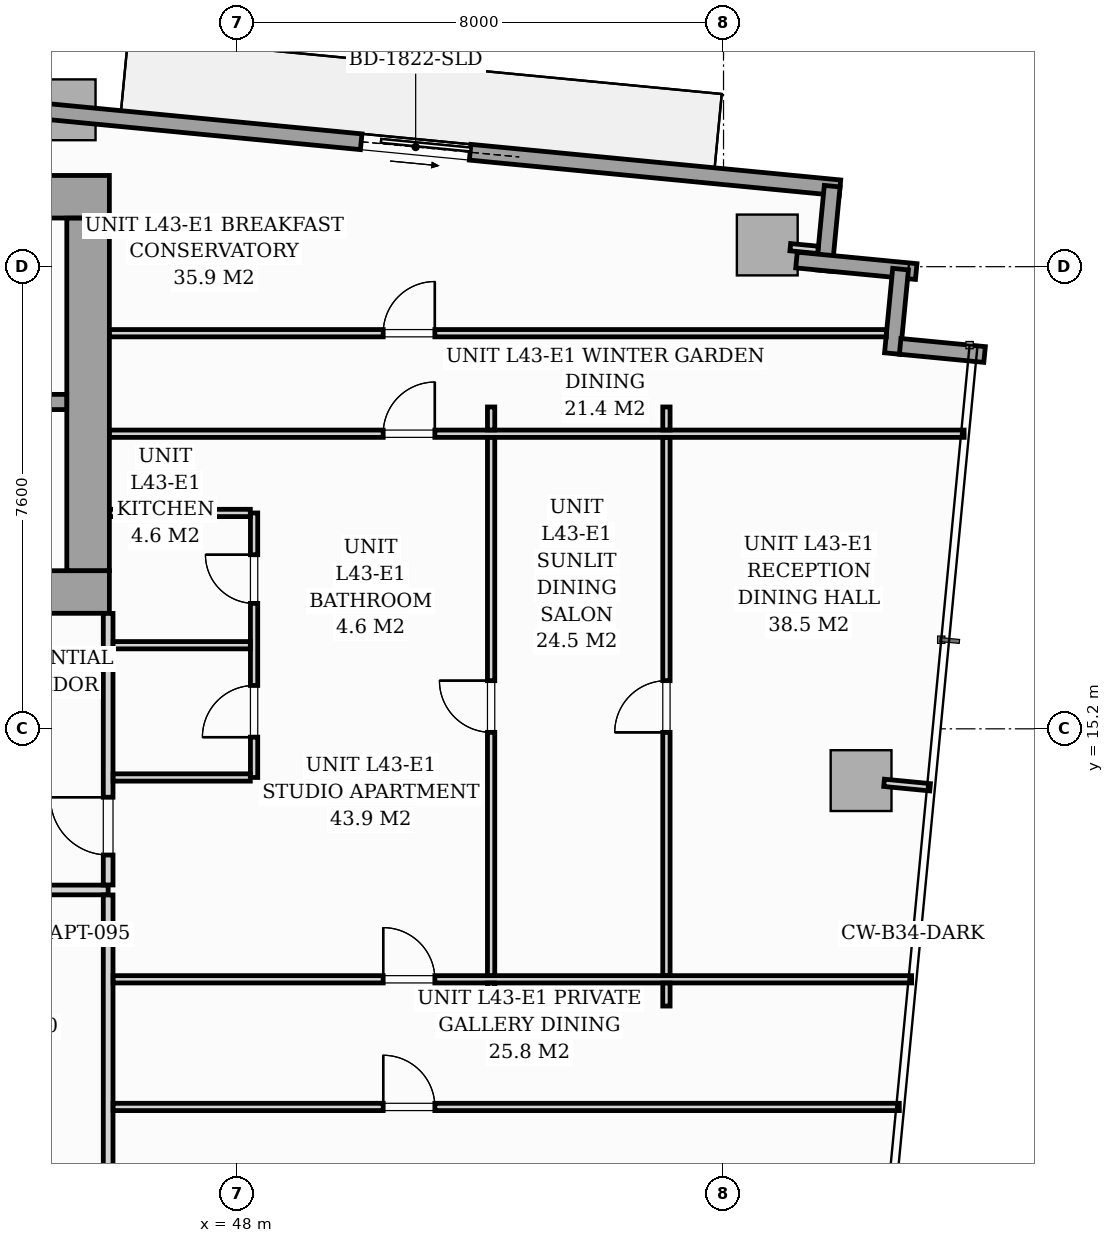
"""IFC4 building model, lengths in metres.
Left out: names, types, materials, properties, quantities, classifications, styles, units other than length and angle.
Written with IfcOpenShell. Run it as: python <this file> out.ifc"""

import sys

from ifc_helpers import new_model, si_unit, direction, frame, frame_2d, origin, origin_2d, place, context, subcontext, project, spatial, rectangle, i_section, extrude, source, transform, mapped, element, fill, save


model = new_model("IFC4")
c1 = context("Model", 3, precision=1e-05, world=origin(), true_north=direction((0.0, 1.0)))
c2 = subcontext(c1, "Body", "Model", "MODEL_VIEW")
j1 = project(units=[si_unit("LENGTHUNIT", "METRE"), si_unit("PLANEANGLEUNIT", "RADIAN")], contexts=[c1])
p1 = place(None, origin())
s1 = spatial("IfcSite", under=j1, at=p1, CompositionType="ELEMENT")
p2 = place(p1, origin())
s2 = spatial("IfcBuilding", under=s1, at=p2, CompositionType="ELEMENT")
p3 = place(p2, frame((0.0, 0.0, 150.2)))
s3 = spatial("IfcBuildingStorey", under=s2, at=p3, CompositionType="ELEMENT", Elevation=150.2)
m1 = source(origin(), c2, "Body", "SweptSolid", [
    extrude(i_section(OverallWidth=0.421, OverallDepth=0.465, WebThickness=0.045, FlangeThickness=0.073, FilletRadius=0.018, at=origin_2d()), origin(), (0.0, 0.0, 1.0), 3.196),
])
for number, where, z_axis, x_axis in (
    (1, (45.6, 17.4, 0.002), (0.0, 0.0, 1.0), (1.0, 0.0, 0.0)),
    (2, (45.6, 24.0, 0.002), (0.0, 0.0, 1.0), (1.0, 0.0, 0.0)),
):
    element("IfcColumn", number, at=place(p3, frame(where, z_axis=z_axis, x_axis=x_axis)), inside=s3, PredefinedType="PILASTER", context=c2, shape_type="MappedRepresentation", body=[
        mapped(m1, transform((0.0, 0.0, 0.0), scale=1.0)),
    ])
m2 = source(origin(), c2, "Body", "SweptSolid", [
    extrude(rectangle(XDim=1.0, YDim=1.0, at=origin_2d()), origin(), (0.0, 0.0, 1.0), 3.196),
])
for number, where, z_axis, x_axis in (
    (3, (45.173, 25.38, 0.002), (0.0, 0.0, 1.0), (0.995, -0.096, 0.0)),
    (4, (56.719, 23.157, 0.002), (0.0, 0.0, 1.0), (0.995, -0.096, 0.0)),
    (5, (58.262, 14.348, 0.002), (0.0, 0.0, 1.0), (0.995, -0.096, 0.0)),
):
    element("IfcColumn", number, at=place(p3, frame(where, z_axis=z_axis, x_axis=x_axis)), inside=s3, PredefinedType="COLUMN", context=c2, shape_type="MappedRepresentation", body=[
        mapped(m2, transform((0.0, 0.0, 0.0), scale=1.0)),
    ])
p4 = place(p3, frame((40.983, 25.727, 0.0), z_axis=(0.0, 0.0, 1.0), x_axis=(0.995395844771, -0.095849424686, 0.0)))
e6 = element("IfcWall", 6, at=p4, inside=s3, PredefinedType="STANDARD", context=c2, shape_type="SweptSolid", body=[
    extrude(rectangle(XDim=17.01, YDim=0.26, at=frame_2d((8.505, 0.0))), origin(), (0.0, 0.0, 1.0), 2.94),
])
p5 = place(p4, frame((9.1, 0.0, 0.0)))
e7 = element("IfcOpeningElement", 7, at=p5, cuts=e6, PredefinedType="OPENING", context=c2, shape_type="SweptSolid", body=[
    extrude(rectangle(XDim=1.8, YDim=2.06, at=frame_2d((0.9, 1.03))), frame((0.0, 0.14, 0.0), z_axis=(0.0, -1.0, 0.0), x_axis=(1.0, 0.0, 0.0)), (0.0, 0.0, 1.0), 0.28),
])
p6 = place(p4, frame((0.7, 0.0, 0.65)))
e8 = element("IfcOpeningElement", 8, at=p6, cuts=e6, PredefinedType="OPENING", context=c2, shape_type="SweptSolid", body=[
    extrude(rectangle(XDim=1.6, YDim=1.5, at=frame_2d((0.8, 0.75))), frame((0.0, 0.14, 0.0), z_axis=(0.0, -1.0, 0.0), x_axis=(1.0, 0.0, 0.0)), (0.0, 0.0, 1.0), 0.28),
])
p7 = place(p3, frame((57.787, 24.124, 0.0), z_axis=(0.0, 0.0, 1.0), x_axis=(-0.095915846097, -0.995389446633, 0.0)))
e9 = element("IfcWall", 9, at=p7, inside=s3, PredefinedType="STANDARD", context=c2, shape_type="SweptSolid", body=[
    extrude(rectangle(XDim=1.395, YDim=0.26, at=frame_2d((0.697, 0.0))), origin(), (0.0, 0.0, 1.0), 2.94),
])
p8 = place(p3, frame((57.2, 22.909, 0.0), z_axis=(0.0, 0.0, 1.0), x_axis=(0.995401789159, -0.095787672171, 0.0)))
e10 = element("IfcWall", 10, at=p8, inside=s3, PredefinedType="STANDARD", context=c2, shape_type="SweptSolid", body=[
    extrude(rectangle(XDim=1.978, YDim=0.26, at=frame_2d((0.989, 0.0))), origin(), (0.0, 0.0, 1.0), 2.94),
])
for number, where, z_axis, x_axis in (
    (11, (58.912, 22.76, 0.0), (0.0, 0.0, 1.0), (-0.096, -0.995, 0.0)),
    (12, (58.905, 21.49, 0.0), (0.0, 0.0, 1.0), (0.995, -0.096, 0.0)),
):
    element("IfcWall", number, at=place(p3, frame(where, z_axis=z_axis, x_axis=x_axis)), inside=s3, PredefinedType="STANDARD", context=c2, shape_type="SweptSolid", body=[
        extrude(rectangle(XDim=1.395, YDim=0.26, at=frame_2d((0.698, 0.0))), origin(), (0.0, 0.0, 1.0), 2.94),
    ])
p9 = place(p3, frame((26.1, 17.45, 0.0), z_axis=(0.0, 0.0, 1.0), x_axis=(1.0, 0.0, 0.0)))
e13 = element("IfcWall", 13, at=p9, inside=s3, PredefinedType="SHEAR", context=c2, shape_type="SweptSolid", body=[
    extrude(rectangle(XDim=19.8, YDim=0.7, at=frame_2d((9.9, 0.0))), origin(), (0.0, 0.0, 1.0), 3.2),
])
p10 = place(p9, frame((1.05, 0.0, 0.0)))
e14 = element("IfcOpeningElement", 14, at=p10, cuts=e13, PredefinedType="OPENING", context=c2, shape_type="SweptSolid", body=[
    extrude(rectangle(XDim=0.95, YDim=2.06, at=frame_2d((0.475, 1.03))), frame((0.0, 0.36, 0.0), z_axis=(0.0, -1.0, 0.0), x_axis=(1.0, 0.0, 0.0)), (0.0, 0.0, 1.0), 0.72),
])
p11 = place(p9, frame((9.48, 0.0, 0.0)))
e15 = element("IfcOpeningElement", 15, at=p11, cuts=e13, PredefinedType="OPENING", context=c2, shape_type="SweptSolid", body=[
    extrude(rectangle(XDim=0.85, YDim=2.0, at=frame_2d((0.425, 1.0))), frame((0.0, 0.36, 0.0), z_axis=(0.0, -1.0, 0.0), x_axis=(1.0, 0.0, 0.0)), (0.0, 0.0, 1.0), 0.72),
])
p12 = place(p9, frame((17.65, 0.0, 0.0)))
e16 = element("IfcOpeningElement", 16, at=p12, cuts=e13, PredefinedType="OPENING", context=c2, shape_type="SweptSolid", body=[
    extrude(rectangle(XDim=0.95, YDim=2.06, at=frame_2d((0.475, 1.03))), frame((0.0, 0.36, 0.0), z_axis=(0.0, -1.0, 0.0), x_axis=(1.0, 0.0, 0.0)), (0.0, 0.0, 1.0), 0.72),
])
p13 = place(p3, frame((26.1, 23.95, 0.0), z_axis=(0.0, 0.0, 1.0), x_axis=(1.0, 0.0, 0.0)))
e17 = element("IfcWall", 17, at=p13, inside=s3, PredefinedType="SHEAR", context=c2, shape_type="SweptSolid", body=[
    extrude(rectangle(XDim=19.8, YDim=0.7, at=frame_2d((9.9, 0.0))), origin(), (0.0, 0.0, 1.0), 3.2),
])
p14 = place(p3, frame((45.55, 17.802, 0.0), z_axis=(0.0, 0.0, 1.0), x_axis=(0.0, 1.0, 0.0)))
e18 = element("IfcWall", 18, at=p14, inside=s3, PredefinedType="SHEAR", context=c2, shape_type="SweptSolid", body=[
    extrude(rectangle(XDim=5.796, YDim=0.7, at=frame_2d((2.898, 0.0))), origin(), (0.0, 0.0, 1.0), 3.2),
])
p15 = place(p3, frame((37.05, 20.575, 0.0), z_axis=(0.0, 0.0, 1.0), x_axis=(1.0, 0.0, 0.0)))
e19 = element("IfcWall", 19, at=p15, inside=s3, PredefinedType="SOLIDWALL", context=c2, shape_type="SweptSolid", body=[
    extrude(rectangle(XDim=8.148, YDim=0.25, at=frame_2d((4.074, 0.0))), origin(), (0.0, 0.0, 1.0), 3.2),
])
p16 = place(p15, frame((6.6, 0.0, 0.0)))
e20 = element("IfcOpeningElement", 20, at=p16, cuts=e19, PredefinedType="OPENING", context=c2, shape_type="SweptSolid", body=[
    extrude(rectangle(XDim=0.95, YDim=2.06, at=frame_2d((0.475, 1.03))), frame((0.0, 0.135, 0.0), z_axis=(0.0, -1.0, 0.0), x_axis=(1.0, 0.0, 0.0)), (0.0, 0.0, 1.0), 0.27),
])
p17 = place(p3, frame((22.05, 12.55, 0.0), z_axis=(0.0, 0.0, 1.0), x_axis=(1.0, 0.0, 0.0)))
e21 = element("IfcWall", 21, at=p17, inside=s3, PredefinedType="PARTITIONING", context=c2, shape_type="SweptSolid", body=[
    extrude(rectangle(XDim=23.83, YDim=0.16, at=frame_2d((11.915, 0.0))), origin(), (0.0, 0.0, 1.0), 2.94),
])
p18 = place(p17, frame((1.873, 0.0, 0.0)))
e22 = element("IfcOpeningElement", 22, at=p18, cuts=e21, PredefinedType="OPENING", context=c2, shape_type="SweptSolid", body=[
    extrude(rectangle(XDim=0.95, YDim=2.06, at=frame_2d((0.475, 1.03))), frame((0.0, 0.09, 0.0), z_axis=(0.0, -1.0, 0.0), x_axis=(1.0, 0.0, 0.0)), (0.0, 0.0, 1.0), 0.18),
])
p19 = place(p17, frame((10.224, 0.0, 0.0)))
e23 = element("IfcOpeningElement", 23, at=p19, cuts=e21, PredefinedType="OPENING", context=c2, shape_type="SweptSolid", body=[
    extrude(rectangle(XDim=0.95, YDim=2.06, at=frame_2d((0.475, 1.03))), frame((0.0, 0.09, 0.0), z_axis=(0.0, -1.0, 0.0), x_axis=(1.0, 0.0, 0.0)), (0.0, 0.0, 1.0), 0.18),
])
p20 = place(p17, frame((21.84, 0.0, 0.0)))
e24 = element("IfcOpeningElement", 24, at=p20, cuts=e21, PredefinedType="OPENING", context=c2, shape_type="SweptSolid", body=[
    extrude(rectangle(XDim=0.95, YDim=2.06, at=frame_2d((0.475, 1.03))), frame((0.0, 0.09, 0.0), z_axis=(0.0, -1.0, 0.0), x_axis=(1.0, 0.0, 0.0)), (0.0, 0.0, 1.0), 0.18),
])
p21 = place(p3, frame((45.88, 5.958, 0.0), z_axis=(0.0, 0.0, 1.0), x_axis=(0.0, 1.0, 0.0)))
e25 = element("IfcWall", 25, at=p21, inside=s3, PredefinedType="PARTITIONING", context=c2, shape_type="SweptSolid", body=[
    extrude(rectangle(XDim=6.51, YDim=0.16, at=frame_2d((3.255, 0.0))), origin(), (0.0, 0.0, 1.0), 2.94),
])
p22 = place(p3, frame((45.88, 12.632, 0.0), z_axis=(0.0, 0.0, 1.0), x_axis=(0.0, 1.0, 0.0)))
e26 = element("IfcWall", 26, at=p22, inside=s3, PredefinedType="PARTITIONING", context=c2, shape_type="SweptSolid", body=[
    extrude(rectangle(XDim=4.466, YDim=0.16, at=frame_2d((2.233, 0.0))), origin(), (0.0, 0.0, 1.0), 2.94),
])
p23 = place(p22, frame((0.493, 0.0, 0.0)))
e27 = element("IfcOpeningElement", 27, at=p23, cuts=e26, PredefinedType="OPENING", context=c2, shape_type="SweptSolid", body=[
    extrude(rectangle(XDim=0.95, YDim=2.06, at=frame_2d((0.475, 1.03))), frame((0.0, 0.09, 0.0), z_axis=(0.0, -1.0, 0.0), x_axis=(1.0, 0.0, 0.0)), (0.0, 0.0, 1.0), 0.18),
])
p24 = place(p3, frame((48.28, 14.4, 0.0), z_axis=(0.0, 0.0, 1.0), x_axis=(0.0, 1.0, 0.0)))
e28 = element("IfcWall", 28, at=p24, inside=s3, PredefinedType="PARTITIONING", context=c2, shape_type="SweptSolid", body=[
    extrude(rectangle(XDim=4.35, YDim=0.12, at=frame_2d((2.175, 0.0))), origin(), (0.0, 0.0, 1.0), 2.94),
])
p25 = place(p24, frame((0.663, 0.0, 0.0)))
e29 = element("IfcOpeningElement", 29, at=p25, cuts=e28, PredefinedType="OPENING", context=c2, shape_type="SweptSolid", body=[
    extrude(rectangle(XDim=0.85, YDim=2.05, at=frame_2d((0.425, 1.025))), frame((0.0, 0.07, 0.0), z_axis=(0.0, -1.0, 0.0), x_axis=(1.0, 0.0, 0.0)), (0.0, 0.0, 1.0), 0.14),
])
p26 = place(p24, frame((2.863, 0.0, 0.0)))
e30 = element("IfcOpeningElement", 30, at=p26, cuts=e28, PredefinedType="OPENING", context=c2, shape_type="SweptSolid", body=[
    extrude(rectangle(XDim=0.8, YDim=2.02, at=frame_2d((0.4, 1.01))), frame((0.0, 0.07, 0.0), z_axis=(0.0, -1.0, 0.0), x_axis=(1.0, 0.0, 0.0)), (0.0, 0.0, 1.0), 0.14),
])
for number, where, z_axis, x_axis in (
    (31, (45.962, 16.575, 0.0), (0.0, 0.0, 1.0), (1.0, 0.0, 0.0)),
    (32, (45.962, 14.4, 0.0), (0.0, 0.0, 1.0), (1.0, 0.0, 0.0)),
):
    element("IfcWall", number, at=place(p3, frame(where, z_axis=z_axis, x_axis=x_axis)), inside=s3, PredefinedType="PARTITIONING", context=c2, shape_type="SweptSolid", body=[
        extrude(rectangle(XDim=2.256, YDim=0.12, at=frame_2d((1.128, 0.0))), origin(), (0.0, 0.0, 1.0), 2.94),
    ])
p27 = place(p3, frame((45.902, 18.75, 0.0), z_axis=(0.0, 0.0, 1.0), x_axis=(1.0, 0.0, 0.0)))
e33 = element("IfcWall", 33, at=p27, inside=s3, PredefinedType="PARTITIONING", context=c2, shape_type="SweptSolid", body=[
    extrude(rectangle(XDim=2.316, YDim=0.12, at=frame_2d((1.158, 0.0))), origin(), (0.0, 0.0, 1.0), 2.94),
])
p28 = place(p3, frame((45.962, 8.982, 0.0), z_axis=(0.0, 0.0, 1.0), x_axis=(1.0, 0.0, 0.0)))
e34 = element("IfcWall", 34, at=p28, inside=s3, PredefinedType="PARTITIONING", context=c2, shape_type="SweptSolid", body=[
    extrude(rectangle(XDim=12.929, YDim=0.12, at=frame_2d((6.464, 0.0))), origin(), (0.0, 0.0, 1.0), 2.94),
])
p29 = place(p28, frame((4.441, 0.0, 0.0)))
e35 = element("IfcOpeningElement", 35, at=p29, cuts=e34, PredefinedType="OPENING", context=c2, shape_type="SweptSolid", body=[
    extrude(rectangle(XDim=0.85, YDim=2.05, at=frame_2d((0.425, 1.025))), frame((0.0, 0.07, 0.0), z_axis=(0.0, -1.0, 0.0), x_axis=(1.0, 0.0, 0.0)), (0.0, 0.0, 1.0), 0.14),
])
p30 = place(p3, frame((45.902, 21.706, 0.0), z_axis=(0.0, 0.0, 1.0), x_axis=(1.0, 0.0, 0.0)))
e36 = element("IfcWall", 36, at=p30, inside=s3, PredefinedType="PARTITIONING", context=c2, shape_type="SweptSolid", body=[
    extrude(rectangle(XDim=12.775, YDim=0.12, at=frame_2d((6.388, 0.0))), origin(), (0.0, 0.0, 1.0), 2.94),
])
p31 = place(p30, frame((4.501, 0.0, 0.0)))
e37 = element("IfcOpeningElement", 37, at=p31, cuts=e36, PredefinedType="OPENING", context=c2, shape_type="SweptSolid", body=[
    extrude(rectangle(XDim=0.85, YDim=2.05, at=frame_2d((0.425, 1.025))), frame((0.0, 0.07, 0.0), z_axis=(0.0, -1.0, 0.0), x_axis=(1.0, 0.0, 0.0)), (0.0, 0.0, 1.0), 0.14),
])
p32 = place(p3, frame((45.962, 11.081, 0.0), z_axis=(0.0, 0.0, 1.0), x_axis=(1.0, 0.0, 0.0)))
e38 = element("IfcWall", 38, at=p32, inside=s3, PredefinedType="PARTITIONING", context=c2, shape_type="SweptSolid", body=[
    extrude(rectangle(XDim=13.131, YDim=0.12, at=frame_2d((6.565, 0.0))), origin(), (0.0, 0.0, 1.0), 2.94),
])
p33 = place(p32, frame((4.441, 0.0, 0.0)))
e39 = element("IfcOpeningElement", 39, at=p33, cuts=e38, PredefinedType="OPENING", context=c2, shape_type="SweptSolid", body=[
    extrude(rectangle(XDim=0.85, YDim=2.05, at=frame_2d((0.425, 1.025))), frame((0.0, 0.07, 0.0), z_axis=(0.0, -1.0, 0.0), x_axis=(1.0, 0.0, 0.0)), (0.0, 0.0, 1.0), 0.14),
])
p34 = place(p3, frame((45.902, 20.053, 0.0), z_axis=(0.0, 0.0, 1.0), x_axis=(1.0, 0.0, 0.0)))
e40 = element("IfcWall", 40, at=p34, inside=s3, PredefinedType="PARTITIONING", context=c2, shape_type="SweptSolid", body=[
    extrude(rectangle(XDim=14.055, YDim=0.12, at=frame_2d((7.027, 0.0))), origin(), (0.0, 0.0, 1.0), 2.94),
])
p35 = place(p34, frame((4.501, 0.0, 0.0)))
e41 = element("IfcOpeningElement", 41, at=p35, cuts=e40, PredefinedType="OPENING", context=c2, shape_type="SweptSolid", body=[
    extrude(rectangle(XDim=0.85, YDim=2.05, at=frame_2d((0.425, 1.025))), frame((0.0, 0.07, 0.0), z_axis=(0.0, -1.0, 0.0), x_axis=(1.0, 0.0, 0.0)), (0.0, 0.0, 1.0), 0.14),
])
p36 = place(p3, frame((55.061, 10.641, 0.0), z_axis=(0.0, 0.0, 1.0), x_axis=(0.0, 1.0, 0.0)))
e42 = element("IfcWall", 42, at=p36, inside=s3, PredefinedType="PARTITIONING", context=c2, shape_type="SweptSolid", body=[
    extrude(rectangle(XDim=0.378, YDim=0.12, at=frame_2d((0.189, 0.0))), origin(), (0.0, 0.0, 1.0), 2.94),
])
p37 = place(p3, frame((55.061, 11.143, 0.0), z_axis=(0.0, 0.0, 1.0), x_axis=(0.0, 1.0, 0.0)))
e43 = element("IfcWall", 43, at=p37, inside=s3, PredefinedType="PARTITIONING", context=c2, shape_type="SweptSolid", body=[
    extrude(rectangle(XDim=8.848, YDim=0.12, at=frame_2d((4.424, 0.0))), origin(), (0.0, 0.0, 1.0), 2.94),
])
p38 = place(p37, frame((3.999, 0.0, 0.0)))
e44 = element("IfcOpeningElement", 44, at=p38, cuts=e43, PredefinedType="OPENING", context=c2, shape_type="SweptSolid", body=[
    extrude(rectangle(XDim=0.85, YDim=2.05, at=frame_2d((0.425, 1.025))), frame((0.0, 0.07, 0.0), z_axis=(0.0, -1.0, 0.0), x_axis=(1.0, 0.0, 0.0)), (0.0, 0.0, 1.0), 0.14),
])
for number, where, z_axis, x_axis in (
    (45, (55.061, 20.115, 0.0), (0.0, 0.0, 1.0), (0.0, 1.0, 0.0)),
    (46, (52.178, 10.641, 0.0), (0.0, 0.0, 1.0), (0.0, 1.0, 0.0)),
):
    element("IfcWall", number, at=place(p3, frame(where, z_axis=z_axis, x_axis=x_axis)), inside=s3, PredefinedType="PARTITIONING", context=c2, shape_type="SweptSolid", body=[
        extrude(rectangle(XDim=0.378, YDim=0.12, at=frame_2d((0.189, 0.0))), origin(), (0.0, 0.0, 1.0), 2.94),
    ])
p39 = place(p3, frame((52.178, 11.143, 0.0), z_axis=(0.0, 0.0, 1.0), x_axis=(0.0, 1.0, 0.0)))
e47 = element("IfcWall", 47, at=p39, inside=s3, PredefinedType="PARTITIONING", context=c2, shape_type="SweptSolid", body=[
    extrude(rectangle(XDim=8.848, YDim=0.12, at=frame_2d((4.424, 0.0))), origin(), (0.0, 0.0, 1.0), 2.94),
])
p40 = place(p39, frame((3.999, 0.0, 0.0)))
e48 = element("IfcOpeningElement", 48, at=p40, cuts=e47, PredefinedType="OPENING", context=c2, shape_type="SweptSolid", body=[
    extrude(rectangle(XDim=0.85, YDim=2.05, at=frame_2d((0.425, 1.025))), frame((0.0, 0.07, 0.0), z_axis=(0.0, -1.0, 0.0), x_axis=(1.0, 0.0, 0.0)), (0.0, 0.0, 1.0), 0.14),
])
p41 = place(p3, frame((52.178, 20.115, 0.0), z_axis=(0.0, 0.0, 1.0), x_axis=(0.0, 1.0, 0.0)))
e49 = element("IfcWall", 49, at=p41, inside=s3, PredefinedType="PARTITIONING", context=c2, shape_type="SweptSolid", body=[
    extrude(rectangle(XDim=0.378, YDim=0.12, at=frame_2d((0.189, 0.0))), origin(), (0.0, 0.0, 1.0), 2.94),
])
p42 = place(p3, frame((57.098, 23.12, 0.0), z_axis=(0.0, 0.0, 1.0), x_axis=(0.995384576284, -0.09596637586, 0.0)))
e50 = element("IfcWall", 50, at=p42, inside=s3, PredefinedType="PARTITIONING", context=c2, shape_type="SweptSolid", body=[
    extrude(rectangle(XDim=0.458, YDim=0.12, at=frame_2d((0.229, 0.0))), origin(), (0.0, 0.0, 1.0), 2.94),
])
p43 = place(p3, frame((58.64, 14.312, 0.0), z_axis=(0.0, 0.0, 1.0), x_axis=(0.995377786728, -0.096036772582, 0.0)))
e51 = element("IfcWall", 51, at=p43, inside=s3, PredefinedType="PARTITIONING", context=c2, shape_type="SweptSolid", body=[
    extrude(rectangle(XDim=0.76, YDim=0.12, at=frame_2d((0.38, 0.0))), origin(), (0.0, 0.0, 1.0), 2.94),
])
m3 = source(origin(), c2, "Body", "SweptSolid", [
    extrude(rectangle(XDim=1.8, YDim=2.06, at=frame_2d((0.9, 1.03))), frame((0.0, 0.025, 0.0), z_axis=(0.0, -1.0, 0.0), x_axis=(1.0, 0.0, 0.0)), (0.0, 0.0, 1.0), 0.05),
])
p44 = place(p5, origin())
e52 = element("IfcDoor", 52, at=p44, inside=s3, OperationType="SLIDING_TO_RIGHT", PredefinedType="DOOR", context=c2, shape_type="MappedRepresentation", body=[
    mapped(m3, transform((0.0, 0.0, 0.0), scale=1.0)),
])
fill(e7, e52)
m4 = source(origin(), c2, "Body", "SweptSolid", [
    extrude(rectangle(XDim=0.95, YDim=2.06, at=frame_2d((0.475, 1.03))), frame((0.0, 0.025, 0.0), z_axis=(0.0, -1.0, 0.0), x_axis=(1.0, 0.0, 0.0)), (0.0, 0.0, 1.0), 0.05),
])
p45 = place(p23, origin())
e53 = element("IfcDoor", 53, at=p45, inside=s3, OperationType="SINGLE_SWING_RIGHT", PredefinedType="DOOR", context=c2, shape_type="MappedRepresentation", body=[
    mapped(m4, transform((0.0, 0.0, 0.0), scale=1.0)),
])
fill(e27, e53)
m5 = source(origin(), c2, "Body", "SweptSolid", [
    extrude(rectangle(XDim=0.85, YDim=2.05, at=frame_2d((0.425, 1.025))), frame((0.0, 0.025, 0.0), z_axis=(0.0, -1.0, 0.0), x_axis=(1.0, 0.0, 0.0)), (0.0, 0.0, 1.0), 0.05),
])
p46 = place(p25, origin())
e54 = element("IfcDoor", 54, at=p46, inside=s3, OperationType="SINGLE_SWING_LEFT", PredefinedType="DOOR", context=c2, shape_type="MappedRepresentation", body=[
    mapped(m5, transform((0.0, 0.0, 0.0), scale=1.0)),
])
fill(e29, e54)
m6 = source(origin(), c2, "Body", "SweptSolid", [
    extrude(rectangle(XDim=0.8, YDim=2.02, at=frame_2d((0.4, 1.01))), frame((0.0, 0.025, 0.0), z_axis=(0.0, -1.0, 0.0), x_axis=(1.0, 0.0, 0.0)), (0.0, 0.0, 1.0), 0.05),
])
p47 = place(p26, origin())
e55 = element("IfcDoor", 55, at=p47, inside=s3, OperationType="SINGLE_SWING_RIGHT", PredefinedType="DOOR", context=c2, shape_type="MappedRepresentation", body=[
    mapped(m6, transform((0.0, 0.0, 0.0), scale=1.0)),
])
fill(e30, e55)
p48 = place(p29, origin())
e56 = element("IfcDoor", 56, at=p48, inside=s3, OperationType="SINGLE_SWING_LEFT", PredefinedType="DOOR", context=c2, shape_type="MappedRepresentation", body=[
    mapped(m5, transform((0.0, 0.0, 0.0), scale=1.0)),
])
fill(e35, e56)
p49 = place(p31, origin())
e57 = element("IfcDoor", 57, at=p49, inside=s3, OperationType="SINGLE_SWING_RIGHT", PredefinedType="DOOR", context=c2, shape_type="MappedRepresentation", body=[
    mapped(m5, transform((0.0, 0.0, 0.0), scale=1.0)),
])
fill(e37, e57)
p50 = place(p33, origin())
e58 = element("IfcDoor", 58, at=p50, inside=s3, OperationType="SINGLE_SWING_LEFT", PredefinedType="DOOR", context=c2, shape_type="MappedRepresentation", body=[
    mapped(m5, transform((0.0, 0.0, 0.0), scale=1.0)),
])
fill(e39, e58)
p51 = place(p35, origin())
e59 = element("IfcDoor", 59, at=p51, inside=s3, OperationType="SINGLE_SWING_RIGHT", PredefinedType="DOOR", context=c2, shape_type="MappedRepresentation", body=[
    mapped(m5, transform((0.0, 0.0, 0.0), scale=1.0)),
])
fill(e41, e59)
p52 = place(p38, origin())
e60 = element("IfcDoor", 60, at=p52, inside=s3, OperationType="SINGLE_SWING_LEFT", PredefinedType="DOOR", context=c2, shape_type="MappedRepresentation", body=[
    mapped(m5, transform((0.0, 0.0, 0.0), scale=1.0)),
])
fill(e44, e60)
p53 = place(p40, origin())
e61 = element("IfcDoor", 61, at=p53, inside=s3, OperationType="SINGLE_SWING_RIGHT", PredefinedType="DOOR", context=c2, shape_type="MappedRepresentation", body=[
    mapped(m5, transform((0.0, 0.0, 0.0), scale=1.0)),
])
fill(e48, e61)
save(model, sys.argv[1])
